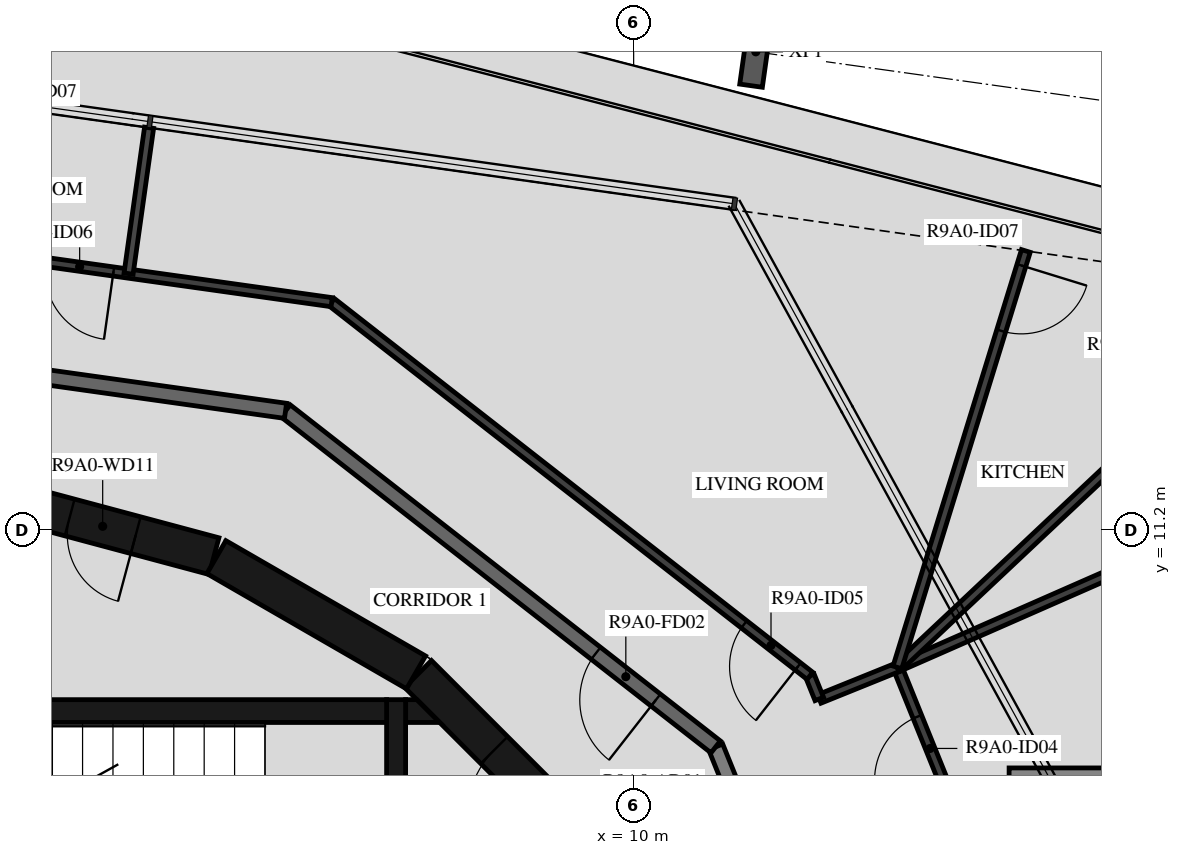
"""IFC4 building model, lengths in metres.
Left out: names, types, materials, properties, quantities, classifications, styles, units other than length and angle.
Written with IfcOpenShell. Run it as: python <this file> out.ifc"""

import sys

from ifc_helpers import new_model, si_unit, direction, frame, frame_2d, origin, origin_2d, place, context, subcontext, project, spatial, polyline, rectangle, i_section, outline, extrude, element, fill, save


model = new_model("IFC4")
c1 = context("Model", 3, precision=1e-05, world=origin(), true_north=direction((0.0, 1.0)))
c2 = subcontext(c1, "Body", "Model", "MODEL_VIEW")
j1 = project(units=[si_unit("LENGTHUNIT", "METRE"), si_unit("PLANEANGLEUNIT", "RADIAN")], contexts=[c1])
p1 = place(None, origin())
s1 = spatial("IfcSite", under=j1, at=p1, CompositionType="ELEMENT")
p2 = place(p1, origin())
s2 = spatial("IfcBuilding", under=s1, at=p2, CompositionType="ELEMENT")
p3 = place(p2, frame((0.0, 0.0, 333.0)))
s3 = spatial("IfcBuildingStorey", under=s2, at=p3, CompositionType="ELEMENT", Elevation=333.0)
p4 = place(p3, frame((11.607, 17.493, -0.45), z_axis=(0.0, 0.0, 1.0), x_axis=(0.990268081324, -0.139173011432, 0.0)))
e1 = element("IfcColumn", 1, at=p4, inside=s3, PredefinedType="COLUMN", context=c2, shape_type="SweptSolid", body=[
    extrude(i_section(OverallWidth=0.3, OverallDepth=0.9, WebThickness=0.019, FlangeThickness=0.035, FilletRadius=0.03, at=origin_2d()), origin(), (0.0, 0.0, 1.0), 3.57),
])
p5 = place(p3, frame((9.308, 7.164, 0.0), z_axis=(0.0, 0.0, 1.0), x_axis=(-0.707106781187, 0.707106781187, 0.0)))
e2 = element("IfcWall", 2, at=p5, inside=s3, PredefinedType="SHEAR", context=c2, shape_type="SweptSolid", body=[
    extrude(rectangle(XDim=3.032, YDim=0.5, at=frame_2d((1.516, 0.0))), origin(), (0.0, 0.0, 1.0), 3.12),
])
p6 = place(p5, frame((0.416, 0.0, 0.0)))
e3 = element("IfcOpeningElement", 3, at=p6, cuts=e2, PredefinedType="OPENING", context=c2, shape_type="SweptSolid", body=[
    extrude(rectangle(XDim=1.2, YDim=2.1, at=frame_2d((0.6, 1.05))), frame((0.0, 0.26, 0.0), z_axis=(0.0, -1.0, 0.0), x_axis=(1.0, 0.0, 0.0)), (0.0, 0.0, 1.0), 0.52),
])
p7 = place(p3, frame((7.137, 9.329, 0.0), z_axis=(0.0, 0.0, 1.0), x_axis=(-0.865975092491, 0.500087131594, 0.0)))
e4 = element("IfcWall", 4, at=p7, inside=s3, PredefinedType="SHEAR", context=c2, shape_type="SweptSolid", body=[
    extrude(rectangle(XDim=3.033, YDim=0.5, at=frame_2d((1.516, 0.0))), origin(), (0.0, 0.0, 1.0), 3.12),
])
p8 = place(p3, frame((4.479, 10.858, 0.0), z_axis=(0.0, 0.0, 1.0), x_axis=(-0.965948410781, 0.258734743916, 0.0)))
e5 = element("IfcWall", 5, at=p8, inside=s3, PredefinedType="SHEAR", context=c2, shape_type="SweptSolid", body=[
    extrude(rectangle(XDim=3.033, YDim=0.5, at=frame_2d((1.516, 0.0))), origin(), (0.0, 0.0, 1.0), 3.12),
])
p9 = place(p8, frame((1.066, 0.0, 0.0)))
e6 = element("IfcOpeningElement", 6, at=p9, cuts=e5, PredefinedType="OPENING", context=c2, shape_type="SweptSolid", body=[
    extrude(rectangle(XDim=0.9, YDim=2.1, at=frame_2d((0.45, 1.05))), frame((0.0, 0.26, 0.0), z_axis=(0.0, -1.0, 0.0), x_axis=(1.0, 0.0, 0.0)), (0.0, 0.0, 1.0), 0.52),
])
p10 = place(p3, frame((0.0, 8.82, 0.0), z_axis=(0.0, 0.0, 1.0), x_axis=(1.0, 0.0, 0.0)))
e7 = element("IfcWall", 7, at=p10, inside=s3, PredefinedType="SHEAR", context=c2, shape_type="SweptSolid", body=[
    extrude(rectangle(XDim=6.75, YDim=0.3, at=frame_2d((3.375, 0.0))), origin(), (0.0, 0.0, 1.0), 3.12),
])
p11 = place(p3, frame((6.875, 5.05, 0.0), z_axis=(0.0, 0.0, 1.0), x_axis=(0.0, 1.0, 0.0)))
e8 = element("IfcWall", 8, at=p11, inside=s3, PredefinedType="SHEAR", context=c2, shape_type="SweptSolid", body=[
    extrude(rectangle(XDim=3.92, YDim=0.25, at=frame_2d((1.96, 0.0))), origin(), (0.0, 0.0, 1.0), 3.12),
])
p12 = place(p11, frame((1.11, 0.0, 0.0)))
e9 = element("IfcOpeningElement", 9, at=p12, cuts=e8, PredefinedType="OPENING", context=c2, shape_type="SweptSolid", body=[
    extrude(rectangle(XDim=1.2, YDim=2.1, at=frame_2d((0.6, 1.05))), frame((0.0, 0.135, 0.0), z_axis=(0.0, -1.0, 0.0), x_axis=(1.0, 0.0, 0.0)), (0.0, 0.0, 1.0), 0.27),
])
p13 = place(p3, origin())
e10 = element("IfcWall", 10, at=p13, inside=s3, PredefinedType="SHEAR", context=c2, shape_type="SweptSolid", body=[
    extrude(outline(polyline([(7.448, 8.67), (7.0, 8.67), (7.0, 8.97), (7.148, 8.97), (7.448, 8.67)])), origin(), (0.0, 0.0, 1.0), 3.12),
])
p14 = place(p3, frame((13.769, 1.691, 0.0), z_axis=(0.0, 0.0, 1.0), x_axis=(-0.374618189599, 0.92717916932, 0.0)))
e11 = element("IfcWall", 11, at=p14, inside=s3, PredefinedType="STANDARD", context=c2, shape_type="SweptSolid", body=[
    extrude(rectangle(XDim=7.181, YDim=0.2, at=frame_2d((3.591, 0.0))), origin(), (0.0, 0.0, 1.0), 3.12),
])
p15 = place(p14, frame((2.371, 0.0, 0.0)))
e12 = element("IfcOpeningElement", 12, at=p15, cuts=e11, PredefinedType="OPENING", context=c2, shape_type="SweptSolid", body=[
    extrude(rectangle(XDim=1.0, YDim=2.1, at=frame_2d((0.5, 1.05))), frame((0.0, 0.11, 0.0), z_axis=(0.0, -1.0, 0.0), x_axis=(1.0, 0.0, 0.0)), (0.0, 0.0, 1.0), 0.22),
])
p16 = place(p3, frame((11.079, 8.349, 0.0), z_axis=(0.0, 0.0, 1.0), x_axis=(-0.78800478687, 0.615669112324, 0.0)))
e13 = element("IfcWall", 13, at=p16, inside=s3, PredefinedType="STANDARD", context=c2, shape_type="SweptSolid", body=[
    extrude(rectangle(XDim=7.181, YDim=0.2, at=frame_2d((3.591, 0.0))), origin(), (0.0, 0.0, 1.0), 3.12),
])
p17 = place(p16, frame((1.0, 0.0, 0.0)))
e14 = element("IfcOpeningElement", 14, at=p17, cuts=e13, PredefinedType="OPENING", context=c2, shape_type="SweptSolid", body=[
    extrude(rectangle(XDim=1.0, YDim=2.1, at=frame_2d((0.5, 1.05))), frame((0.0, 0.11, 0.0), z_axis=(0.0, -1.0, 0.0), x_axis=(1.0, 0.0, 0.0)), (0.0, 0.0, 1.0), 0.22),
])
p18 = place(p3, frame((5.42, 12.77, 0.0), z_axis=(0.0, 0.0, 1.0), x_axis=(-0.990270565508, 0.139155334385, 0.0)))
e15 = element("IfcWall", 15, at=p18, inside=s3, PredefinedType="STANDARD", context=c2, shape_type="SweptSolid", body=[
    extrude(rectangle(XDim=7.181, YDim=0.2, at=frame_2d((3.59, 0.0))), origin(), (0.0, 0.0, 1.0), 3.12),
])
p19 = place(p3, frame((14.406, 7.076, 0.0), z_axis=(0.0, 0.0, 1.0), x_axis=(-0.374503415005, 0.927225534673, 0.0)))
e16 = element("IfcWall", 16, at=p19, inside=s3, PredefinedType="PARTITIONING", context=c2, shape_type="SweptSolid", body=[
    extrude(rectangle(XDim=2.5, YDim=0.12, at=frame_2d((1.25, 0.0))), origin(), (0.0, 0.0, 1.0), 3.12),
])
p20 = place(p19, frame((0.9, 0.0, 0.0)))
e17 = element("IfcOpeningElement", 17, at=p20, cuts=e16, PredefinedType="OPENING", context=c2, shape_type="SweptSolid", body=[
    extrude(rectangle(XDim=0.9, YDim=2.1, at=frame_2d((0.45, 1.05))), frame((0.0, 0.07, 0.0), z_axis=(0.0, -1.0, 0.0), x_axis=(1.0, 0.0, 0.0)), (0.0, 0.0, 1.0), 0.14),
])
p21 = place(p3, frame((13.47, 9.395, 0.0), z_axis=(0.0, 0.0, 1.0), x_axis=(-0.927180061276, -0.374615982003, 0.0)))
e18 = element("IfcWall", 18, at=p21, inside=s3, PredefinedType="PARTITIONING", context=c2, shape_type="SweptSolid", body=[
    extrude(rectangle(XDim=1.109, YDim=0.12, at=frame_2d((0.554, 0.0))), origin(), (0.0, 0.0, 1.0), 3.12),
])
p22 = place(p3, frame((12.442, 8.979, 0.0), z_axis=(0.0, 0.0, 1.0), x_axis=(-0.374979656603, 0.927033039936, 0.0)))
e19 = element("IfcWall", 19, at=p22, inside=s3, PredefinedType="PARTITIONING", context=c2, shape_type="SweptSolid", body=[
    extrude(rectangle(XDim=0.328, YDim=0.12, at=frame_2d((0.164, 0.0))), origin(), (0.0, 0.0, 1.0), 3.12),
])
p23 = place(p3, frame((12.319, 9.283, 0.0), z_axis=(0.0, 0.0, 1.0), x_axis=(-0.788000268464, 0.61567489546, 0.0)))
e20 = element("IfcWall", 20, at=p23, inside=s3, PredefinedType="PARTITIONING", context=c2, shape_type="SweptSolid", body=[
    extrude(rectangle(XDim=7.985, YDim=0.12, at=frame_2d((3.992, 0.0))), origin(), (0.0, 0.0, 1.0), 3.12),
])
p24 = place(p23, frame((0.2, 0.0, 0.0)))
e21 = element("IfcOpeningElement", 21, at=p24, cuts=e20, PredefinedType="OPENING", context=c2, shape_type="SweptSolid", body=[
    extrude(rectangle(XDim=0.9, YDim=2.1, at=frame_2d((0.45, 1.05))), frame((0.0, 0.07, 0.0), z_axis=(0.0, -1.0, 0.0), x_axis=(1.0, 0.0, 0.0)), (0.0, 0.0, 1.0), 0.14),
])
p25 = place(p3, frame((6.027, 14.199, 0.0), z_axis=(0.0, 0.0, 1.0), x_axis=(-0.990271593532, 0.139148018469, 0.0)))
e22 = element("IfcWall", 22, at=p25, inside=s3, PredefinedType="PARTITIONING", context=c2, shape_type="SweptSolid", body=[
    extrude(rectangle(XDim=7.985, YDim=0.12, at=frame_2d((3.992, 0.0))), origin(), (0.0, 0.0, 1.0), 3.12),
])
p26 = place(p25, frame((2.898, 0.0, 0.0)))
e23 = element("IfcOpeningElement", 23, at=p26, cuts=e22, PredefinedType="OPENING", context=c2, shape_type="SweptSolid", body=[
    extrude(rectangle(XDim=0.9, YDim=2.1, at=frame_2d((0.45, 1.05))), frame((0.0, 0.07, 0.0), z_axis=(0.0, -1.0, 0.0), x_axis=(1.0, 0.0, 0.0)), (0.0, 0.0, 1.0), 0.14),
])
p27 = place(p3, frame((21.338, 12.851, 0.0), z_axis=(0.0, 0.0, 1.0), x_axis=(-0.915538158579, -0.402231127818, 0.0)))
e24 = element("IfcWall", 24, at=p27, inside=s3, PredefinedType="PARTITIONING", context=c2, shape_type="SweptSolid", body=[
    extrude(rectangle(XDim=8.594, YDim=0.12, at=frame_2d((4.297, 0.0))), origin(), (0.0, 0.0, 1.0), 3.12),
])
p28 = place(p3, frame((18.633, 14.248, 0.0), z_axis=(0.0, 0.0, 1.0), x_axis=(-0.728595344908, -0.684944394369, 0.0)))
e25 = element("IfcWall", 25, at=p28, inside=s3, PredefinedType="PARTITIONING", context=c2, shape_type="SweptSolid", body=[
    extrude(rectangle(XDim=7.086, YDim=0.12, at=frame_2d((3.543, 0.0))), origin(), (0.0, 0.0, 1.0), 3.12),
])
p29 = place(p28, frame((0.5, 0.0, 0.0)))
e26 = element("IfcOpeningElement", 26, at=p29, cuts=e25, PredefinedType="OPENING", context=c2, shape_type="SweptSolid", body=[
    extrude(rectangle(XDim=0.8, YDim=2.1, at=frame_2d((0.4, 1.05))), frame((0.0, 0.07, 0.0), z_axis=(0.0, -1.0, 0.0), x_axis=(1.0, 0.0, 0.0)), (0.0, 0.0, 1.0), 0.14),
])
p30 = place(p3, frame((15.16, 14.873, 0.0), z_axis=(0.0, 0.0, 1.0), x_axis=(-0.294750051258, -0.955574386055, 0.0)))
e27 = element("IfcWall", 27, at=p30, inside=s3, PredefinedType="PARTITIONING", context=c2, shape_type="SweptSolid", body=[
    extrude(rectangle(XDim=5.733, YDim=0.12, at=frame_2d((2.867, 0.0))), origin(), (0.0, 0.0, 1.0), 3.12),
])
p31 = place(p30, frame((0.2, 0.0, 0.0)))
e28 = element("IfcOpeningElement", 28, at=p31, cuts=e27, PredefinedType="OPENING", context=c2, shape_type="SweptSolid", body=[
    extrude(rectangle(XDim=0.9, YDim=2.1, at=frame_2d((0.45, 1.05))), frame((0.0, 0.07, 0.0), z_axis=(0.0, -1.0, 0.0), x_axis=(1.0, 0.0, 0.0)), (0.0, 0.0, 1.0), 0.14),
])
p32 = place(p3, frame((3.625, 16.494, 0.0), z_axis=(0.0, 0.0, 1.0), x_axis=(-0.139181494832, -0.990266889023, 0.0)))
e29 = element("IfcWall", 29, at=p32, inside=s3, PredefinedType="PARTITIONING", context=c2, shape_type="SweptSolid", body=[
    extrude(rectangle(XDim=1.938, YDim=0.12, at=frame_2d((0.969, 0.0))), origin(), (0.0, 0.0, 1.0), 2.73),
])
p33 = place(p3, origin())
e30 = element("IfcWall", 30, at=p33, inside=s3, PredefinedType="STANDARD", context=c2, shape_type="SweptSolid", body=[
    extrude(outline(polyline([(17.84, 8.072), (17.84, 5.172), (14.94, 5.172), (14.94, 8.072), (17.84, 8.072)]), holes=[polyline([(15.14, 5.372), (17.64, 5.372), (17.64, 7.872), (15.14, 7.872), (15.14, 5.372)])]), origin(), (0.0, 0.0, 1.0), 3.12),
])
p34 = place(p6, origin())
e31 = element("IfcDoor", 31, at=p34, inside=s3, OperationType="SINGLE_SWING_RIGHT", PredefinedType="DOOR", context=c2, shape_type="SweptSolid", body=[
    extrude(rectangle(XDim=1.2, YDim=2.1, at=frame_2d((0.6, 1.05))), frame((0.0, 0.025, 0.0), z_axis=(0.0, -1.0, 0.0), x_axis=(1.0, 0.0, 0.0)), (0.0, 0.0, 1.0), 0.05),
])
fill(e3, e31)
p35 = place(p9, origin())
e32 = element("IfcDoor", 32, at=p35, inside=s3, OperationType="SINGLE_SWING_LEFT", PredefinedType="DOOR", context=c2, shape_type="SweptSolid", body=[
    extrude(rectangle(XDim=0.9, YDim=2.1, at=frame_2d((0.45, 1.05))), frame((0.0, 0.025, 0.0), z_axis=(0.0, -1.0, 0.0), x_axis=(1.0, 0.0, 0.0)), (0.0, 0.0, 1.0), 0.05),
])
fill(e6, e32)
p36 = place(p17, origin())
e33 = element("IfcDoor", 33, at=p36, inside=s3, OperationType="SINGLE_SWING_LEFT", PredefinedType="DOOR", context=c2, shape_type="SweptSolid", body=[
    extrude(rectangle(XDim=1.0, YDim=2.1, at=frame_2d((0.5, 1.05))), frame((0.0, 0.025, 0.0), z_axis=(0.0, -1.0, 0.0), x_axis=(1.0, 0.0, 0.0)), (0.0, 0.0, 1.0), 0.05),
])
fill(e14, e33)
p37 = place(p20, origin())
e34 = element("IfcDoor", 34, at=p37, inside=s3, OperationType="SINGLE_SWING_LEFT", PredefinedType="DOOR", context=c2, shape_type="SweptSolid", body=[
    extrude(rectangle(XDim=0.9, YDim=2.1, at=frame_2d((0.45, 1.05))), frame((0.0, 0.025, 0.0), z_axis=(0.0, -1.0, 0.0), x_axis=(1.0, 0.0, 0.0)), (0.0, 0.0, 1.0), 0.05),
])
fill(e17, e34)
p38 = place(p24, origin())
e35 = element("IfcDoor", 35, at=p38, inside=s3, OperationType="SINGLE_SWING_LEFT", PredefinedType="DOOR", context=c2, shape_type="SweptSolid", body=[
    extrude(rectangle(XDim=0.9, YDim=2.1, at=frame_2d((0.45, 1.05))), frame((0.0, 0.025, 0.0), z_axis=(0.0, -1.0, 0.0), x_axis=(1.0, 0.0, 0.0)), (0.0, 0.0, 1.0), 0.05),
])
fill(e21, e35)
p39 = place(p26, origin())
e36 = element("IfcDoor", 36, at=p39, inside=s3, OperationType="SINGLE_SWING_LEFT", PredefinedType="DOOR", context=c2, shape_type="SweptSolid", body=[
    extrude(rectangle(XDim=0.9, YDim=2.1, at=frame_2d((0.45, 1.05))), frame((0.0, 0.025, 0.0), z_axis=(0.0, -1.0, 0.0), x_axis=(1.0, 0.0, 0.0)), (0.0, 0.0, 1.0), 0.05),
])
fill(e23, e36)
p40 = place(p31, origin())
e37 = element("IfcDoor", 37, at=p40, inside=s3, OperationType="SINGLE_SWING_LEFT", PredefinedType="DOOR", context=c2, shape_type="SweptSolid", body=[
    extrude(rectangle(XDim=0.9, YDim=2.1, at=frame_2d((0.45, 1.05))), frame((0.0, 0.025, 0.0), z_axis=(0.0, -1.0, 0.0), x_axis=(1.0, 0.0, 0.0)), (0.0, 0.0, 1.0), 0.05),
])
fill(e28, e37)
save(model, sys.argv[1])
